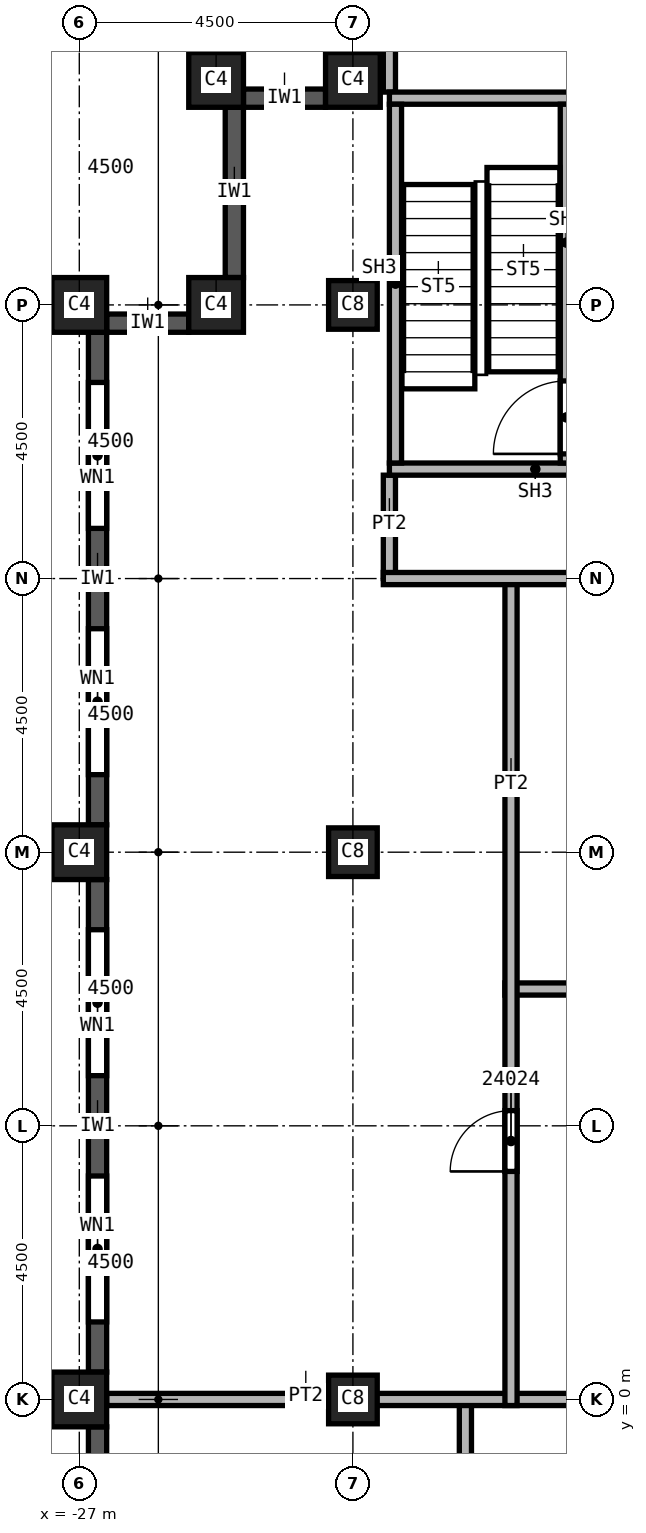
"""IFC4 building model, lengths in metres.
Left out: names, types, materials, properties, quantities, classifications, styles, units other than length and angle.
Written with IfcOpenShell. Run it as: python <this file> out.ifc"""

import sys

from ifc_helpers import new_model, si_unit, direction, frame, frame_2d, origin, origin_2d, place, context, subcontext, project, spatial, rectangle, extrude, element, fill, save


model = new_model("IFC4")
c1 = context("Model", 3, precision=1e-05, world=origin(), true_north=direction((0.0, 1.0)))
c2 = subcontext(c1, "Body", "Model", "MODEL_VIEW")
j1 = project(units=[si_unit("LENGTHUNIT", "METRE"), si_unit("PLANEANGLEUNIT", "RADIAN")], contexts=[c1])
p1 = place(None, origin())
s1 = spatial("IfcSite", under=j1, at=p1, CompositionType="ELEMENT")
p2 = place(p1, origin())
s2 = spatial("IfcBuilding", under=s1, at=p2, CompositionType="ELEMENT")
p3 = place(p2, frame((0.0, 0.0, 338.0)))
s3 = spatial("IfcBuildingStorey", under=s2, at=p3, CompositionType="ELEMENT", Elevation=338.0)
for number, where, z_axis, x_axis in (
    (1, (-22.5, 0.0, 0.0), (0.0, 0.0, 1.0), (1.0, 0.0, 0.0)),
    (2, (-22.5, 9.0, 0.0), (0.0, 0.0, 1.0), (1.0, 0.0, 0.0)),
    (3, (-22.5, 18.0, 0.0), (0.0, 0.0, 1.0), (1.0, 0.0, 0.0)),
):
    element("IfcColumn", number, at=place(p3, frame(where, z_axis=z_axis, x_axis=x_axis)), inside=s3, PredefinedType="COLUMN", context=c2, shape_type="SweptSolid", body=[
        extrude(rectangle(XDim=0.8, YDim=0.8, at=origin_2d()), origin(), (0.0, 0.0, 1.0), 3.74),
    ])
for number, where, z_axis, x_axis in (
    (4, (-27.0, 0.0, 0.0), (0.0, 0.0, 1.0), (0.0, 1.0, 0.0)),
    (5, (-27.0, 9.0, 0.0), (0.0, 0.0, 1.0), (0.0, 1.0, 0.0)),
    (6, (-27.0, 18.0, 0.0), (0.0, 0.0, 1.0), (0.0, 1.0, 0.0)),
    (7, (-22.5, 21.7, 0.0), (0.0, 0.0, 1.0), (1.0, 0.0, 0.0)),
    (8, (-24.75, 21.7, 0.0), (0.0, 0.0, 1.0), (1.0, 0.0, 0.0)),
    (9, (-24.75, 18.0, 0.0), (0.0, 0.0, 1.0), (1.0, 0.0, 0.0)),
):
    element("IfcColumn", number, at=place(p3, frame(where, z_axis=z_axis, x_axis=x_axis)), inside=s3, PredefinedType="COLUMN", context=c2, shape_type="SweptSolid", body=[
        extrude(rectangle(XDim=0.9, YDim=0.9, at=origin_2d()), origin(), (0.0, 0.0, 1.0), 3.74),
    ])
p4 = place(p3, frame((-24.45, 21.25, 0.0), z_axis=(0.0, 0.0, 1.0), x_axis=(0.0, -1.0, 0.0)))
e10 = element("IfcWall", 10, at=p4, inside=s3, PredefinedType="SOLIDWALL", context=c2, shape_type="SweptSolid", body=[
    extrude(rectangle(XDim=2.8, YDim=0.3, at=frame_2d((1.4, 0.0))), origin(), (0.0, 0.0, 1.0), 3.14),
])
p5 = place(p3, frame((-25.2, 17.7, 0.0), z_axis=(0.0, 0.0, 1.0), x_axis=(-1.0, 0.0, 0.0)))
e11 = element("IfcWall", 11, at=p5, inside=s3, PredefinedType="SOLIDWALL", context=c2, shape_type="SweptSolid", body=[
    extrude(rectangle(XDim=1.35, YDim=0.3, at=frame_2d((0.675, 0.0))), origin(), (0.0, 0.0, 1.0), 3.14),
])
p6 = place(p3, frame((-26.7, 17.55, 0.0), z_axis=(0.0, 0.0, 1.0), x_axis=(0.0, -1.0, 0.0)))
e12 = element("IfcWall", 12, at=p6, inside=s3, PredefinedType="SOLIDWALL", context=c2, shape_type="SweptSolid", body=[
    extrude(rectangle(XDim=8.1, YDim=0.3, at=frame_2d((4.05, 0.0))), origin(), (0.0, 0.0, 1.0), 3.14),
])
p7 = place(p6, frame((0.825, 0.0, 0.8)))
e13 = element("IfcOpeningElement", 13, at=p7, cuts=e12, PredefinedType="OPENING", context=c2, shape_type="SweptSolid", body=[
    extrude(rectangle(XDim=2.4, YDim=1.95, at=frame_2d((1.2, 0.975))), frame((0.0, 0.15, 0.0), z_axis=(0.0, -1.0, 0.0), x_axis=(1.0, 0.0, 0.0)), (0.0, 0.0, 1.0), 0.3),
])
p8 = place(p6, frame((4.875, 0.0, 0.8)))
e14 = element("IfcOpeningElement", 14, at=p8, cuts=e12, PredefinedType="OPENING", context=c2, shape_type="SweptSolid", body=[
    extrude(rectangle(XDim=2.4, YDim=1.95, at=frame_2d((1.2, 0.975))), frame((0.0, 0.15, 0.0), z_axis=(0.0, -1.0, 0.0), x_axis=(1.0, 0.0, 0.0)), (0.0, 0.0, 1.0), 0.3),
])
p9 = place(p3, frame((-26.7, 8.55, 0.0), z_axis=(0.0, 0.0, 1.0), x_axis=(0.0, -1.0, 0.0)))
e15 = element("IfcWall", 15, at=p9, inside=s3, PredefinedType="SOLIDWALL", context=c2, shape_type="SweptSolid", body=[
    extrude(rectangle(XDim=8.1, YDim=0.3, at=frame_2d((4.05, 0.0))), origin(), (0.0, 0.0, 1.0), 3.14),
])
p10 = place(p9, frame((0.825, 0.0, 0.8)))
e16 = element("IfcOpeningElement", 16, at=p10, cuts=e15, PredefinedType="OPENING", context=c2, shape_type="SweptSolid", body=[
    extrude(rectangle(XDim=2.4, YDim=1.95, at=frame_2d((1.2, 0.975))), frame((0.0, 0.15, 0.0), z_axis=(0.0, -1.0, 0.0), x_axis=(1.0, 0.0, 0.0)), (0.0, 0.0, 1.0), 0.3),
])
p11 = place(p9, frame((4.875, 0.0, 0.8)))
e17 = element("IfcOpeningElement", 17, at=p11, cuts=e15, PredefinedType="OPENING", context=c2, shape_type="SweptSolid", body=[
    extrude(rectangle(XDim=2.4, YDim=1.95, at=frame_2d((1.2, 0.975))), frame((0.0, 0.15, 0.0), z_axis=(0.0, -1.0, 0.0), x_axis=(1.0, 0.0, 0.0)), (0.0, 0.0, 1.0), 0.3),
])
p12 = place(p3, frame((-26.7, -0.45, 0.0), z_axis=(0.0, 0.0, 1.0), x_axis=(0.0, -1.0, 0.0)))
e18 = element("IfcWall", 18, at=p12, inside=s3, PredefinedType="SOLIDWALL", context=c2, shape_type="SweptSolid", body=[
    extrude(rectangle(XDim=8.1, YDim=0.3, at=frame_2d((4.05, 0.0))), origin(), (0.0, 0.0, 1.0), 3.14),
])
p13 = place(p12, frame((0.825, 0.0, 0.8)))
e19 = element("IfcOpeningElement", 19, at=p13, cuts=e18, PredefinedType="OPENING", context=c2, shape_type="SweptSolid", body=[
    extrude(rectangle(XDim=2.4, YDim=1.95, at=frame_2d((1.2, 0.975))), frame((0.0, 0.15, 0.0), z_axis=(0.0, -1.0, 0.0), x_axis=(1.0, 0.0, 0.0)), (0.0, 0.0, 1.0), 0.3),
])
p14 = place(p12, frame((4.875, 0.0, 0.8)))
e20 = element("IfcOpeningElement", 20, at=p14, cuts=e18, PredefinedType="OPENING", context=c2, shape_type="SweptSolid", body=[
    extrude(rectangle(XDim=2.4, YDim=1.95, at=frame_2d((1.2, 0.975))), frame((0.0, 0.15, 0.0), z_axis=(0.0, -1.0, 0.0), x_axis=(1.0, 0.0, 0.0)), (0.0, 0.0, 1.0), 0.3),
])
p15 = place(p3, frame((-22.95, 21.4, 0.0), z_axis=(0.0, 0.0, 1.0), x_axis=(-1.0, 0.0, 0.0)))
e21 = element("IfcWall", 21, at=p15, inside=s3, PredefinedType="SOLIDWALL", context=c2, shape_type="SweptSolid", body=[
    extrude(rectangle(XDim=1.35, YDim=0.3, at=frame_2d((0.675, 0.0))), origin(), (0.0, 0.0, 1.0), 3.14),
])
p16 = place(p3, frame((-21.9, 13.5, 0.0), z_axis=(0.0, 0.0, 1.0), x_axis=(0.0, 1.0, 0.0)))
e22 = element("IfcWall", 22, at=p16, inside=s3, PredefinedType="PARTITIONING", context=c2, shape_type="SweptSolid", body=[
    extrude(rectangle(XDim=1.7, YDim=0.2, at=frame_2d((0.85, 0.0))), origin(), (0.0, 0.0, 1.0), 3.74),
])
p17 = place(p3, frame((-21.9, 21.5, 0.0), z_axis=(0.0, 0.0, 1.0), x_axis=(0.0, 1.0, 0.0)))
e23 = element("IfcWall", 23, at=p17, inside=s3, PredefinedType="PARTITIONING", context=c2, shape_type="SweptSolid", body=[
    extrude(rectangle(XDim=3.45, YDim=0.2, at=frame_2d((1.725, 0.0))), origin(), (0.0, 0.0, 1.0), 3.74),
])
p18 = place(p3, frame((-20.65, -11.25, 0.0), z_axis=(0.0, 0.0, 1.0), x_axis=(0.0, 1.0, 0.0)))
e24 = element("IfcWall", 24, at=p18, inside=s3, PredefinedType="PARTITIONING", context=c2, shape_type="SweptSolid", body=[
    extrude(rectangle(XDim=11.25, YDim=0.2, at=frame_2d((5.625, 0.0))), origin(), (0.0, 0.0, 1.0), 3.74),
])
p19 = place(p18, frame((7.75, 0.0, 0.0)))
e25 = element("IfcOpeningElement", 25, at=p19, cuts=e24, PredefinedType="OPENING", context=c2, shape_type="SweptSolid", body=[
    extrude(rectangle(XDim=1.0, YDim=2.1, at=frame_2d((0.5, 1.05))), frame((0.0, 0.1, 0.0), z_axis=(0.0, -1.0, 0.0), x_axis=(1.0, 0.0, 0.0)), (0.0, 0.0, 1.0), 0.2),
])
p20 = place(p3, frame((-15.4, 0.0, 0.0), z_axis=(0.0, 0.0, 1.0), x_axis=(-1.0, 0.0, 0.0)))
e26 = element("IfcWall", 26, at=p20, inside=s3, PredefinedType="PARTITIONING", context=c2, shape_type="SweptSolid", body=[
    extrude(rectangle(XDim=11.15, YDim=0.2, at=frame_2d((5.575, 0.0))), origin(), (0.0, 0.0, 1.0), 3.74),
])
p21 = place(p3, frame((-20.0, 6.75, 0.0), z_axis=(0.0, 0.0, 1.0), x_axis=(1.0, 0.0, 0.0)))
e27 = element("IfcWall", 27, at=p21, inside=s3, PredefinedType="PARTITIONING", context=c2, shape_type="SweptSolid", body=[
    extrude(rectangle(XDim=4.6, YDim=0.2, at=frame_2d((2.3, 0.0))), origin(), (0.0, 0.0, 1.0), 3.74),
])
p22 = place(p3, frame((-19.9, -0.1, 0.0), z_axis=(0.0, 0.0, 1.0), x_axis=(0.0, 1.0, 0.0)))
e28 = element("IfcWall", 28, at=p22, inside=s3, PredefinedType="PARTITIONING", context=c2, shape_type="SweptSolid", body=[
    extrude(rectangle(XDim=13.6, YDim=0.2, at=frame_2d((6.8, 0.0))), origin(), (0.0, 0.0, 1.0), 3.74),
])
p23 = place(p22, frame((3.85, 0.0, 0.0)))
e29 = element("IfcOpeningElement", 29, at=p23, cuts=e28, PredefinedType="OPENING", context=c2, shape_type="SweptSolid", body=[
    extrude(rectangle(XDim=1.0, YDim=2.1, at=frame_2d((0.5, 1.05))), frame((0.0, 0.1, 0.0), z_axis=(0.0, -1.0, 0.0), x_axis=(1.0, 0.0, 0.0)), (0.0, 0.0, 1.0), 0.2),
])
p24 = place(p3, frame((-15.4, 13.5, 0.0), z_axis=(0.0, 0.0, 1.0), x_axis=(-1.0, 0.0, 0.0)))
e30 = element("IfcWall", 30, at=p24, inside=s3, PredefinedType="PARTITIONING", context=c2, shape_type="SweptSolid", body=[
    extrude(rectangle(XDim=6.6, YDim=0.2, at=frame_2d((3.3, 0.0))), origin(), (0.0, 0.0, 1.0), 3.74),
])
p25 = place(p3, frame((-21.9, 15.3, 0.0), z_axis=(0.0, 0.0, 1.0), x_axis=(1.0, 0.0, 0.0)))
e31 = element("IfcWall", 31, at=p25, inside=s3, PredefinedType="SOLIDWALL", context=c2, shape_type="SweptSolid", body=[
    extrude(rectangle(XDim=8.275, YDim=0.2, at=frame_2d((4.137, 0.0))), origin(), (0.0, 0.0, 1.0), 3.74),
])
p26 = place(p25, frame((4.8, 0.0, 0.0)))
e32 = element("IfcOpeningElement", 32, at=p26, cuts=e31, PredefinedType="OPENING", context=c2, shape_type="SweptSolid", body=[
    extrude(rectangle(XDim=1.2, YDim=2.1, at=frame_2d((0.6, 1.05))), frame((0.0, 0.1, 0.0), z_axis=(0.0, -1.0, 0.0), x_axis=(1.0, 0.0, 0.0)), (0.0, 0.0, 1.0), 0.2),
])
p27 = place(p3, frame((-21.9, 21.4, 0.0), z_axis=(0.0, 0.0, 1.0), x_axis=(1.0, 0.0, 0.0)))
e33 = element("IfcWall", 33, at=p27, inside=s3, PredefinedType="SOLIDWALL", context=c2, shape_type="SweptSolid", body=[
    extrude(rectangle(XDim=7.8, YDim=0.2, at=frame_2d((3.9, 0.0))), origin(), (0.0, 0.0, 1.0), 3.74),
])
p28 = place(p27, frame((3.2, 0.0, 0.0)))
e34 = element("IfcOpeningElement", 34, at=p28, cuts=e33, PredefinedType="OPENING", context=c2, shape_type="SweptSolid", body=[
    extrude(rectangle(XDim=1.2, YDim=2.1, at=frame_2d((0.6, 1.05))), frame((0.0, 0.1, 0.0), z_axis=(0.0, -1.0, 0.0), x_axis=(1.0, 0.0, 0.0)), (0.0, 0.0, 1.0), 0.2),
])
p29 = place(p3, frame((-21.8, 15.4, 0.0), z_axis=(0.0, 0.0, 1.0), x_axis=(0.0, 1.0, 0.0)))
e35 = element("IfcWall", 35, at=p29, inside=s3, PredefinedType="SOLIDWALL", context=c2, shape_type="SweptSolid", body=[
    extrude(rectangle(XDim=5.9, YDim=0.2, at=frame_2d((2.95, 0.0))), origin(), (0.0, 0.0, 1.0), 3.74),
])
p30 = place(p3, frame((-18.99, 15.4, 0.0), z_axis=(0.0, 0.0, 1.0), x_axis=(0.0, 1.0, 0.0)))
e36 = element("IfcWall", 36, at=p30, inside=s3, PredefinedType="SOLIDWALL", context=c2, shape_type="SweptSolid", body=[
    extrude(rectangle(XDim=5.9, YDim=0.2, at=frame_2d((2.95, 0.0))), origin(), (0.0, 0.0, 1.0), 3.74),
])
p31 = place(p30, frame((0.15, 0.0, 0.0)))
e37 = element("IfcOpeningElement", 37, at=p31, cuts=e36, PredefinedType="OPENING", context=c2, shape_type="SweptSolid", body=[
    extrude(rectangle(XDim=1.2, YDim=2.1, at=frame_2d((0.6, 1.05))), frame((0.0, 0.1, 0.0), z_axis=(0.0, -1.0, 0.0), x_axis=(1.0, 0.0, 0.0)), (0.0, 0.0, 1.0), 0.2),
])
p32 = place(p7, origin())
e38 = element("IfcWindow", 38, at=p32, inside=s3, PartitioningType="SINGLE_PANEL", PredefinedType="WINDOW", context=c2, shape_type="SweptSolid", body=[
    extrude(rectangle(XDim=2.4, YDim=1.95, at=frame_2d((1.2, 0.975))), frame((0.0, 0.03, 0.0), z_axis=(0.0, -1.0, 0.0), x_axis=(1.0, 0.0, 0.0)), (0.0, 0.0, 1.0), 0.06),
])
fill(e13, e38)
p33 = place(p8, origin())
e39 = element("IfcWindow", 39, at=p33, inside=s3, PartitioningType="SINGLE_PANEL", PredefinedType="WINDOW", context=c2, shape_type="SweptSolid", body=[
    extrude(rectangle(XDim=2.4, YDim=1.95, at=frame_2d((1.2, 0.975))), frame((0.0, 0.03, 0.0), z_axis=(0.0, -1.0, 0.0), x_axis=(1.0, 0.0, 0.0)), (0.0, 0.0, 1.0), 0.06),
])
fill(e14, e39)
p34 = place(p10, origin())
e40 = element("IfcWindow", 40, at=p34, inside=s3, PartitioningType="SINGLE_PANEL", PredefinedType="WINDOW", context=c2, shape_type="SweptSolid", body=[
    extrude(rectangle(XDim=2.4, YDim=1.95, at=frame_2d((1.2, 0.975))), frame((0.0, 0.03, 0.0), z_axis=(0.0, -1.0, 0.0), x_axis=(1.0, 0.0, 0.0)), (0.0, 0.0, 1.0), 0.06),
])
fill(e16, e40)
p35 = place(p11, origin())
e41 = element("IfcWindow", 41, at=p35, inside=s3, PartitioningType="SINGLE_PANEL", PredefinedType="WINDOW", context=c2, shape_type="SweptSolid", body=[
    extrude(rectangle(XDim=2.4, YDim=1.95, at=frame_2d((1.2, 0.975))), frame((0.0, 0.03, 0.0), z_axis=(0.0, -1.0, 0.0), x_axis=(1.0, 0.0, 0.0)), (0.0, 0.0, 1.0), 0.06),
])
fill(e17, e41)
p36 = place(p23, origin())
e42 = element("IfcDoor", 42, at=p36, inside=s3, OperationType="SINGLE_SWING_LEFT", PredefinedType="DOOR", context=c2, shape_type="SweptSolid", body=[
    extrude(rectangle(XDim=1.0, YDim=2.1, at=frame_2d((0.5, 1.05))), frame((0.0, 0.025, 0.0), z_axis=(0.0, -1.0, 0.0), x_axis=(1.0, 0.0, 0.0)), (0.0, 0.0, 1.0), 0.05),
])
fill(e29, e42)
p37 = place(p31, origin())
e43 = element("IfcDoor", 43, at=p37, inside=s3, OperationType="SINGLE_SWING_LEFT", PredefinedType="DOOR", context=c2, shape_type="SweptSolid", body=[
    extrude(rectangle(XDim=1.2, YDim=2.1, at=frame_2d((0.6, 1.05))), frame((0.0, 0.025, 0.0), z_axis=(0.0, -1.0, 0.0), x_axis=(1.0, 0.0, 0.0)), (0.0, 0.0, 1.0), 0.05),
])
fill(e37, e43)
save(model, sys.argv[1])
